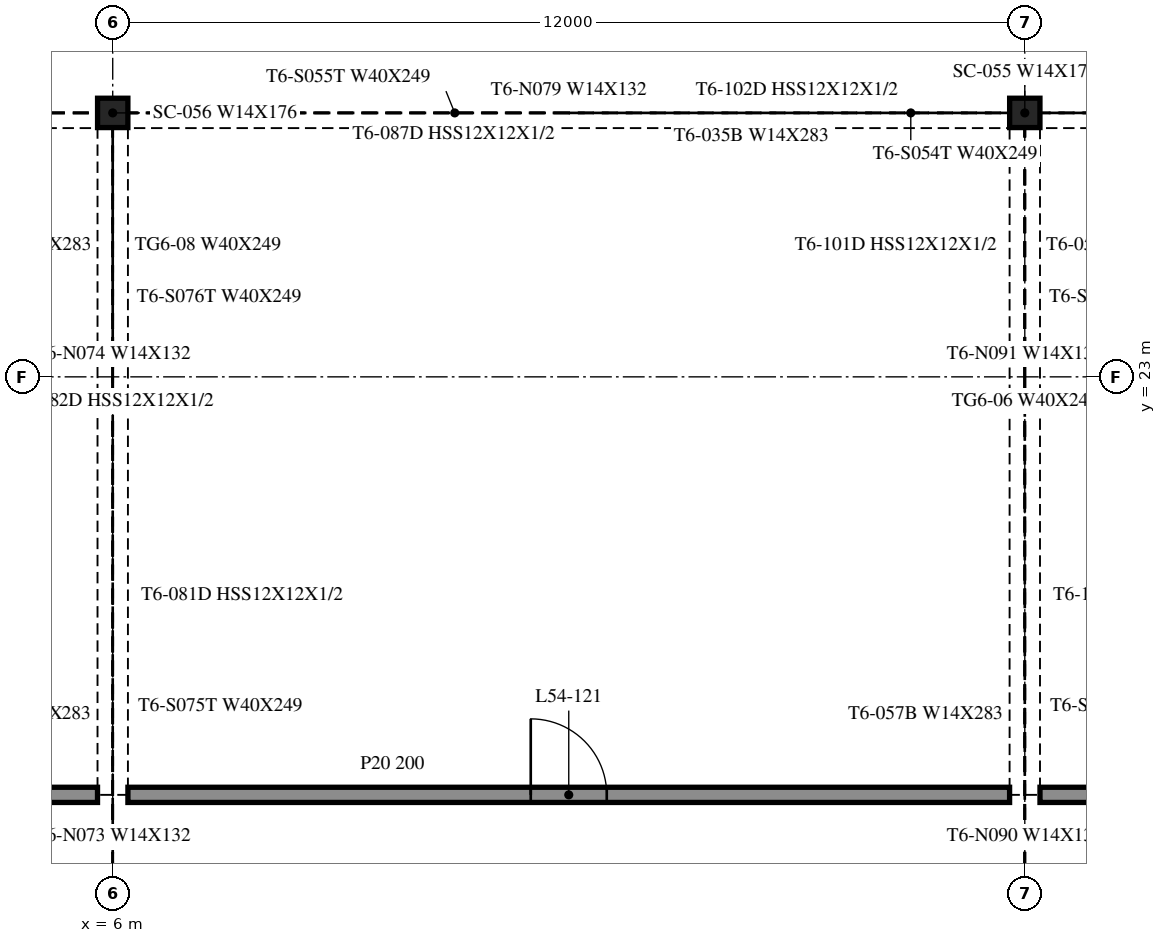
"""IFC4 building model, lengths in metres.
Left out: names, types, materials, properties, quantities, classifications, styles, units other than length and angle.
Written with IfcOpenShell. Run it as: python <this file> out.ifc"""

import sys

from ifc_helpers import new_model, si_unit, direction, frame, frame_2d, origin, origin_2d, place, context, subcontext, project, spatial, rectangle, i_section, extrude, element, fill, save


model = new_model("IFC4")
c1 = context("Model", 3, precision=1e-05, world=origin(), true_north=direction((0.0, 1.0)))
c2 = subcontext(c1, "Body", "Model", "MODEL_VIEW")
j1 = project(units=[si_unit("LENGTHUNIT", "METRE"), si_unit("PLANEANGLEUNIT", "RADIAN")], contexts=[c1])
p1 = place(None, origin())
s1 = spatial("IfcSite", under=j1, at=p1, CompositionType="ELEMENT")
p2 = place(p1, origin())
s2 = spatial("IfcBuilding", under=s1, at=p2, CompositionType="ELEMENT")
p3 = place(p2, frame((0.0, 0.0, 224.3)))
s3 = spatial("IfcBuildingStorey", under=s2, at=p3, CompositionType="ELEMENT", Elevation=224.3)
for number, where, z_axis, x_axis in (
    (1, (18.0, 26.473, -0.4), (0.0, 0.0, 1.0), (1.0, 0.0, 0.0)),
    (2, (6.0, 26.473, -0.4), (0.0, 0.0, 1.0), (1.0, 0.0, 0.0)),
):
    element("IfcColumn", number, at=place(p3, frame(where, z_axis=z_axis, x_axis=x_axis)), inside=s3, PredefinedType="COLUMN", context=c2, shape_type="SweptSolid", body=[
        extrude(i_section(OverallWidth=0.399, OverallDepth=0.386, WebThickness=0.021, FlangeThickness=0.033, at=origin_2d()), origin(), (0.0, 0.0, 1.0), 4.36),
    ])
p4 = place(p3, frame((-5.8, 17.5, 0.0), z_axis=(0.0, 0.0, 1.0), x_axis=(1.0, 0.0, 0.0)))
e3 = element("IfcWall", 3, at=p4, inside=s3, PredefinedType="PARTITIONING", context=c2, shape_type="SweptSolid", body=[
    extrude(rectangle(XDim=11.6, YDim=0.2, at=frame_2d((5.8, 0.0))), origin(), (0.0, 0.0, 1.0), 3.96),
])
p5 = place(p4, frame((5.1, 0.0, 0.0)))
e4 = element("IfcOpeningElement", 4, at=p5, cuts=e3, PredefinedType="OPENING", context=c2, shape_type="SweptSolid", body=[
    extrude(rectangle(XDim=1.2, YDim=2.1, at=frame_2d((0.6, 1.05))), frame((0.0, 0.11, 0.0), z_axis=(0.0, -1.0, 0.0), x_axis=(1.0, 0.0, 0.0)), (0.0, 0.0, 1.0), 0.22),
])
p6 = place(p3, frame((6.2, 17.5, 0.0), z_axis=(0.0, 0.0, 1.0), x_axis=(1.0, 0.0, 0.0)))
e5 = element("IfcWall", 5, at=p6, inside=s3, PredefinedType="PARTITIONING", context=c2, shape_type="SweptSolid", body=[
    extrude(rectangle(XDim=11.6, YDim=0.2, at=frame_2d((5.8, 0.0))), origin(), (0.0, 0.0, 1.0), 3.96),
])
p7 = place(p6, frame((5.3, 0.0, 0.0)))
e6 = element("IfcOpeningElement", 6, at=p7, cuts=e5, PredefinedType="OPENING", context=c2, shape_type="SweptSolid", body=[
    extrude(rectangle(XDim=1.0, YDim=2.1, at=frame_2d((0.5, 1.05))), frame((0.0, 0.11, 0.0), z_axis=(0.0, -1.0, 0.0), x_axis=(1.0, 0.0, 0.0)), (0.0, 0.0, 1.0), 0.22),
])
p8 = place(p3, frame((18.2, 17.5, 0.0), z_axis=(0.0, 0.0, 1.0), x_axis=(1.0, 0.0, 0.0)))
e7 = element("IfcWall", 7, at=p8, inside=s3, PredefinedType="PARTITIONING", context=c2, shape_type="SweptSolid", body=[
    extrude(rectangle(XDim=11.6, YDim=0.2, at=frame_2d((5.8, 0.0))), origin(), (0.0, 0.0, 1.0), 3.96),
])
p9 = place(p8, frame((5.1, 0.0, 0.0)))
e8 = element("IfcOpeningElement", 8, at=p9, cuts=e7, PredefinedType="OPENING", context=c2, shape_type="SweptSolid", body=[
    extrude(rectangle(XDim=1.2, YDim=2.1, at=frame_2d((0.6, 1.05))), frame((0.0, 0.11, 0.0), z_axis=(0.0, -1.0, 0.0), x_axis=(1.0, 0.0, 0.0)), (0.0, 0.0, 1.0), 0.22),
])
p10 = place(p7, origin())
e9 = element("IfcDoor", 9, at=p10, inside=s3, OperationType="SINGLE_SWING_LEFT", PredefinedType="DOOR", context=c2, shape_type="SweptSolid", body=[
    extrude(rectangle(XDim=1.0, YDim=2.1, at=frame_2d((0.5, 1.05))), frame((0.0, 0.025, 0.0), z_axis=(0.0, -1.0, 0.0), x_axis=(1.0, 0.0, 0.0)), (0.0, 0.0, 1.0), 0.05),
])
fill(e6, e9)
save(model, sys.argv[1])
